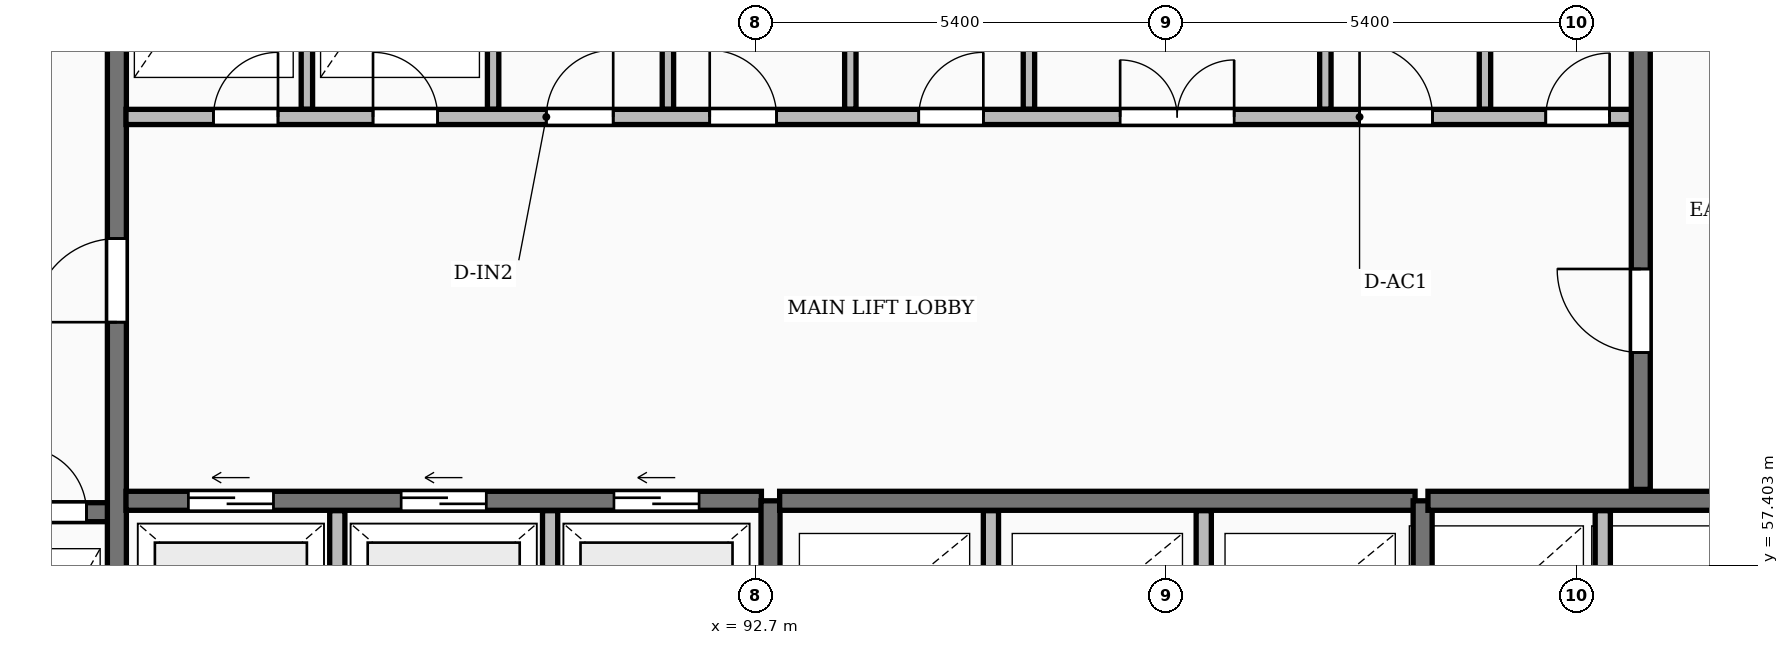
"""IFC4 building model, lengths in metres.
Left out: names, types, materials, properties, quantities, classifications, styles, units other than length and angle.
Written with IfcOpenShell. Run it as: python <this file> out.ifc"""

import sys

from ifc_helpers import new_model, si_unit, direction, frame, frame_2d, origin, place, context, subcontext, project, spatial, rectangle, extrude, element, fill, save


model = new_model("IFC4")
c1 = context("Model", 3, precision=1e-05, world=origin(), true_north=direction((0.0, 1.0)))
c2 = subcontext(c1, "Body", "Model", "MODEL_VIEW")
j1 = project(units=[si_unit("LENGTHUNIT", "METRE"), si_unit("PLANEANGLEUNIT", "RADIAN")], contexts=[c1])
p1 = place(None, origin())
s1 = spatial("IfcSite", under=j1, at=p1, CompositionType="ELEMENT")
p2 = place(p1, origin())
s2 = spatial("IfcBuilding", under=s1, at=p2, CompositionType="ELEMENT")
p3 = place(p2, frame((0.0, 0.0, 80.8)))
s3 = spatial("IfcBuildingStorey", under=s2, at=p3, CompositionType="ELEMENT", Elevation=80.8)
p4 = place(p3, frame((79.79, 58.1, 0.0), z_axis=(0.0, 0.0, 1.0), x_axis=(1.0, 0.0, 0.0)))
e1 = element("IfcWall", 1, at=p4, inside=s3, PredefinedType="SHEAR", context=c2, shape_type="SweptSolid", body=[
    extrude(rectangle(XDim=4.39, YDim=0.25, at=frame_2d((2.195, 0.0))), origin(), (0.0, 0.0, 1.0), 3.25),
])
p5 = place(p4, frame((1.05, 0.0, 0.0)))
e2 = element("IfcOpeningElement", 2, at=p5, cuts=e1, PredefinedType="OPENING", context=c2, shape_type="SweptSolid", body=[
    extrude(rectangle(XDim=1.12, YDim=2.12, at=frame_2d((0.56, 1.06))), frame((0.0, 0.135, 0.0), z_axis=(0.0, -1.0, 0.0), x_axis=(1.0, 0.0, 0.0)), (0.0, 0.0, 1.0), 0.27),
])
p6 = place(p4, frame((3.26, 0.0, 0.0)))
e3 = element("IfcOpeningElement", 3, at=p6, cuts=e1, PredefinedType="OPENING", context=c2, shape_type="SweptSolid", body=[
    extrude(rectangle(XDim=0.85, YDim=2.05, at=frame_2d((0.425, 1.025))), frame((0.0, 0.135, 0.0), z_axis=(0.0, -1.0, 0.0), x_axis=(1.0, 0.0, 0.0)), (0.0, 0.0, 1.0), 0.27),
])
p7 = place(p3, frame((84.3, 55.4, 0.0), z_axis=(0.0, 0.0, 1.0), x_axis=(0.0, 1.0, 0.0)))
e4 = element("IfcWall", 4, at=p7, inside=s3, PredefinedType="SHEAR", context=c2, shape_type="SweptSolid", body=[
    extrude(rectangle(XDim=11.6, YDim=0.25, at=frame_2d((5.8, 0.0))), origin(), (0.0, 0.0, 1.0), 3.25),
])
p8 = place(p7, frame((5.2, 0.0, 0.0)))
e5 = element("IfcOpeningElement", 5, at=p8, cuts=e4, PredefinedType="OPENING", context=c2, shape_type="SweptSolid", body=[
    extrude(rectangle(XDim=1.1, YDim=2.1, at=frame_2d((0.55, 1.05))), frame((0.0, 0.135, 0.0), z_axis=(0.0, -1.0, 0.0), x_axis=(1.0, 0.0, 0.0)), (0.0, 0.0, 1.0), 0.27),
])
for number, where, z_axis, x_axis in (
    (6, (87.2, 55.4, 0.0), (0.0, 0.0, 1.0), (0.0, 1.0, 0.0)),
    (7, (90.0, 55.4, 0.0), (0.0, 0.0, 1.0), (0.0, 1.0, 0.0)),
):
    element("IfcWall", number, at=place(p3, frame(where, z_axis=z_axis, x_axis=x_axis)), inside=s3, PredefinedType="PARTITIONING", context=c2, shape_type="SweptSolid", body=[
        extrude(rectangle(XDim=2.72, YDim=0.2, at=frame_2d((1.36, 0.0))), origin(), (0.0, 0.0, 1.0), 2.97),
    ])
p9 = place(p3, frame((84.42, 58.25, 0.0), z_axis=(0.0, 0.0, 1.0), x_axis=(1.0, 0.0, 0.0)))
e8 = element("IfcWall", 8, at=p9, inside=s3, PredefinedType="SHEAR", context=c2, shape_type="SweptSolid", body=[
    extrude(rectangle(XDim=8.36, YDim=0.25, at=frame_2d((4.18, 0.0))), origin(), (0.0, 0.0, 1.0), 3.25),
])
p10 = place(p9, frame((0.82, 0.0, 0.0)))
e9 = element("IfcOpeningElement", 9, at=p10, cuts=e8, PredefinedType="OPENING", context=c2, shape_type="SweptSolid", body=[
    extrude(rectangle(XDim=1.12, YDim=2.12, at=frame_2d((0.56, 1.06))), frame((0.0, 0.135, 0.0), z_axis=(0.0, -1.0, 0.0), x_axis=(1.0, 0.0, 0.0)), (0.0, 0.0, 1.0), 0.27),
])
p11 = place(p9, frame((3.62, 0.0, 0.0)))
e10 = element("IfcOpeningElement", 10, at=p11, cuts=e8, PredefinedType="OPENING", context=c2, shape_type="SweptSolid", body=[
    extrude(rectangle(XDim=1.12, YDim=2.12, at=frame_2d((0.56, 1.06))), frame((0.0, 0.135, 0.0), z_axis=(0.0, -1.0, 0.0), x_axis=(1.0, 0.0, 0.0)), (0.0, 0.0, 1.0), 0.27),
])
p12 = place(p9, frame((6.42, 0.0, 0.0)))
e11 = element("IfcOpeningElement", 11, at=p12, cuts=e8, PredefinedType="OPENING", context=c2, shape_type="SweptSolid", body=[
    extrude(rectangle(XDim=1.12, YDim=2.12, at=frame_2d((0.56, 1.06))), frame((0.0, 0.135, 0.0), z_axis=(0.0, -1.0, 0.0), x_axis=(1.0, 0.0, 0.0)), (0.0, 0.0, 1.0), 0.27),
])
p13 = place(p3, frame((92.9, 55.4, 0.0), z_axis=(0.0, 0.0, 1.0), x_axis=(0.0, 1.0, 0.0)))
e12 = element("IfcWall", 12, at=p13, inside=s3, PredefinedType="SHEAR", context=c2, shape_type="SweptSolid", body=[
    extrude(rectangle(XDim=2.85, YDim=0.25, at=frame_2d((1.425, 0.0))), origin(), (0.0, 0.0, 1.0), 3.25),
])
for number, where, z_axis, x_axis in (
    (13, (95.8, 55.4, 0.0), (0.0, 0.0, 1.0), (0.0, 1.0, 0.0)),
    (14, (98.6, 55.4, 0.0), (0.0, 0.0, 1.0), (0.0, 1.0, 0.0)),
):
    element("IfcWall", number, at=place(p3, frame(where, z_axis=z_axis, x_axis=x_axis)), inside=s3, PredefinedType="PARTITIONING", context=c2, shape_type="SweptSolid", body=[
        extrude(rectangle(XDim=2.72, YDim=0.2, at=frame_2d((1.36, 0.0))), origin(), (0.0, 0.0, 1.0), 2.97),
    ])
p14 = place(p3, frame((93.02, 58.25, 0.0), z_axis=(0.0, 0.0, 1.0), x_axis=(1.0, 0.0, 0.0)))
e15 = element("IfcWall", 15, at=p14, inside=s3, PredefinedType="SHEAR", context=c2, shape_type="SweptSolid", body=[
    extrude(rectangle(XDim=8.36, YDim=0.25, at=frame_2d((4.18, 0.0))), origin(), (0.0, 0.0, 1.0), 3.25),
])
p15 = place(p3, frame((101.48, 55.4, 0.0), z_axis=(0.0, 0.0, 1.0), x_axis=(0.0, 1.0, 0.0)))
e16 = element("IfcWall", 16, at=p15, inside=s3, PredefinedType="SHEAR", context=c2, shape_type="SweptSolid", body=[
    extrude(rectangle(XDim=2.85, YDim=0.25, at=frame_2d((1.425, 0.0))), origin(), (0.0, 0.0, 1.0), 3.25),
])
p16 = place(p3, frame((103.85, 55.4, 0.0), z_axis=(0.0, 0.0, 1.0), x_axis=(0.0, 1.0, 0.0)))
e17 = element("IfcWall", 17, at=p16, inside=s3, PredefinedType="PARTITIONING", context=c2, shape_type="SweptSolid", body=[
    extrude(rectangle(XDim=2.72, YDim=0.2, at=frame_2d((1.36, 0.0))), origin(), (0.0, 0.0, 1.0), 2.97),
])
p17 = place(p3, frame((101.55, 58.25, 0.0), z_axis=(0.0, 0.0, 1.0), x_axis=(1.0, 0.0, 0.0)))
e18 = element("IfcWall", 18, at=p17, inside=s3, PredefinedType="SHEAR", context=c2, shape_type="SweptSolid", body=[
    extrude(rectangle(XDim=4.6, YDim=0.25, at=frame_2d((2.3, 0.0))), origin(), (0.0, 0.0, 1.0), 3.25),
])
for number, where, z_axis, x_axis in (
    (19, (86.8, 63.4, 0.0), (0.0, 0.0, 1.0), (0.0, 1.0, 0.0)),
    (20, (89.25, 63.4, 0.0), (0.0, 0.0, 1.0), (0.0, 1.0, 0.0)),
    (21, (91.55, 63.4, 0.0), (0.0, 0.0, 1.0), (0.0, 1.0, 0.0)),
):
    element("IfcWall", number, at=place(p3, frame(where, z_axis=z_axis, x_axis=x_axis)), inside=s3, PredefinedType="PARTITIONING", context=c2, shape_type="SweptSolid", body=[
        extrude(rectangle(XDim=3.6, YDim=0.15, at=frame_2d((1.8, 0.0))), origin(), (0.0, 0.0, 1.0), 2.97),
    ])
p18 = place(p3, frame((93.95, 63.4, 0.0), z_axis=(0.0, 0.0, 1.0), x_axis=(0.0, 1.0, 0.0)))
e22 = element("IfcWall", 22, at=p18, inside=s3, PredefinedType="PARTITIONING", context=c2, shape_type="SweptSolid", body=[
    extrude(rectangle(XDim=3.6, YDim=0.15, at=frame_2d((1.8, 0.0))), origin(), (0.0, 0.0, 1.0), 2.277),
])
for number, where, z_axis, x_axis in (
    (23, (102.3, 63.4, 0.0), (0.0, 0.0, 1.0), (0.0, 1.0, 0.0)),
    (24, (96.3, 63.4, 0.0), (0.0, 0.0, 1.0), (0.0, 1.0, 0.0)),
    (25, (100.2, 63.4, 0.0), (0.0, 0.0, 1.0), (0.0, 1.0, 0.0)),
):
    element("IfcWall", number, at=place(p3, frame(where, z_axis=z_axis, x_axis=x_axis)), inside=s3, PredefinedType="PARTITIONING", context=c2, shape_type="SweptSolid", body=[
        extrude(rectangle(XDim=3.6, YDim=0.15, at=frame_2d((1.8, 0.0))), origin(), (0.0, 0.0, 1.0), 2.97),
    ])
p19 = place(p3, frame((84.42, 63.3, 0.0), z_axis=(0.0, 0.0, 1.0), x_axis=(1.0, 0.0, 0.0)))
e26 = element("IfcWall", 26, at=p19, inside=s3, PredefinedType="PARTITIONING", context=c2, shape_type="SweptSolid", body=[
    extrude(rectangle(XDim=19.83, YDim=0.2, at=frame_2d((9.915, 0.0))), origin(), (0.0, 0.0, 1.0), 2.97),
])
p20 = place(p19, frame((1.15, 0.0, 0.0)))
e27 = element("IfcOpeningElement", 27, at=p20, cuts=e26, PredefinedType="OPENING", context=c2, shape_type="SweptSolid", body=[
    extrude(rectangle(XDim=0.85, YDim=2.05, at=frame_2d((0.425, 1.025))), frame((0.0, 0.11, 0.0), z_axis=(0.0, -1.0, 0.0), x_axis=(1.0, 0.0, 0.0)), (0.0, 0.0, 1.0), 0.22),
])
p21 = place(p19, frame((3.25, 0.0, 0.0)))
e28 = element("IfcOpeningElement", 28, at=p21, cuts=e26, PredefinedType="OPENING", context=c2, shape_type="SweptSolid", body=[
    extrude(rectangle(XDim=0.85, YDim=2.05, at=frame_2d((0.425, 1.025))), frame((0.0, 0.11, 0.0), z_axis=(0.0, -1.0, 0.0), x_axis=(1.0, 0.0, 0.0)), (0.0, 0.0, 1.0), 0.22),
])
p22 = place(p19, frame((13.08, 0.0, 0.0)))
e29 = element("IfcOpeningElement", 29, at=p22, cuts=e26, PredefinedType="OPENING", context=c2, shape_type="SweptSolid", body=[
    extrude(rectangle(XDim=1.5, YDim=2.2, at=frame_2d((0.75, 1.1))), frame((0.0, 0.11, 0.0), z_axis=(0.0, -1.0, 0.0), x_axis=(1.0, 0.0, 0.0)), (0.0, 0.0, 1.0), 0.22),
])
p23 = place(p19, frame((5.53, 0.0, 0.0)))
e30 = element("IfcOpeningElement", 30, at=p23, cuts=e26, PredefinedType="OPENING", context=c2, shape_type="SweptSolid", body=[
    extrude(rectangle(XDim=0.88, YDim=2.06, at=frame_2d((0.44, 1.03))), frame((0.0, 0.11, 0.0), z_axis=(0.0, -1.0, 0.0), x_axis=(1.0, 0.0, 0.0)), (0.0, 0.0, 1.0), 0.22),
])
p24 = place(p19, frame((7.68, 0.0, 0.0)))
e31 = element("IfcOpeningElement", 31, at=p24, cuts=e26, PredefinedType="OPENING", context=c2, shape_type="SweptSolid", body=[
    extrude(rectangle(XDim=0.88, YDim=2.06, at=frame_2d((0.44, 1.03))), frame((0.0, 0.11, 0.0), z_axis=(0.0, -1.0, 0.0), x_axis=(1.0, 0.0, 0.0)), (0.0, 0.0, 1.0), 0.22),
])
p25 = place(p19, frame((10.43, 0.0, 0.0)))
e32 = element("IfcOpeningElement", 32, at=p25, cuts=e26, PredefinedType="OPENING", context=c2, shape_type="SweptSolid", body=[
    extrude(rectangle(XDim=0.85, YDim=2.05, at=frame_2d((0.425, 1.025))), frame((0.0, 0.11, 0.0), z_axis=(0.0, -1.0, 0.0), x_axis=(1.0, 0.0, 0.0)), (0.0, 0.0, 1.0), 0.22),
])
p26 = place(p19, frame((16.23, 0.0, 0.0)))
e33 = element("IfcOpeningElement", 33, at=p26, cuts=e26, PredefinedType="OPENING", context=c2, shape_type="SweptSolid", body=[
    extrude(rectangle(XDim=0.96, YDim=2.1, at=frame_2d((0.48, 1.05))), frame((0.0, 0.11, 0.0), z_axis=(0.0, -1.0, 0.0), x_axis=(1.0, 0.0, 0.0)), (0.0, 0.0, 1.0), 0.22),
])
p27 = place(p19, frame((18.68, 0.0, 0.0)))
e34 = element("IfcOpeningElement", 34, at=p27, cuts=e26, PredefinedType="OPENING", context=c2, shape_type="SweptSolid", body=[
    extrude(rectangle(XDim=0.84, YDim=2.04, at=frame_2d((0.42, 1.02))), frame((0.0, 0.11, 0.0), z_axis=(0.0, -1.0, 0.0), x_axis=(1.0, 0.0, 0.0)), (0.0, 0.0, 1.0), 0.22),
])
p28 = place(p3, frame((104.35, 58.4, 0.0), z_axis=(0.0, 0.0, 1.0), x_axis=(0.0, 1.0, 0.0)))
e35 = element("IfcWall", 35, at=p28, inside=s3, PredefinedType="SHEAR", context=c2, shape_type="SweptSolid", body=[
    extrude(rectangle(XDim=8.6, YDim=0.25, at=frame_2d((4.3, 0.0))), origin(), (0.0, 0.0, 1.0), 3.25),
])
p29 = place(p28, frame((1.8, 0.0, 0.0)))
e36 = element("IfcOpeningElement", 36, at=p29, cuts=e35, PredefinedType="OPENING", context=c2, shape_type="SweptSolid", body=[
    extrude(rectangle(XDim=1.1, YDim=2.1, at=frame_2d((0.55, 1.05))), frame((0.0, 0.135, 0.0), z_axis=(0.0, -1.0, 0.0), x_axis=(1.0, 0.0, 0.0)), (0.0, 0.0, 1.0), 0.27),
])
p30 = place(p6, origin())
e37 = element("IfcDoor", 37, at=p30, inside=s3, OperationType="SINGLE_SWING_LEFT", PredefinedType="DOOR", context=c2, shape_type="SweptSolid", body=[
    extrude(rectangle(XDim=0.85, YDim=2.05, at=frame_2d((0.425, 1.025))), frame((0.0, 0.025, 0.0), z_axis=(0.0, -1.0, 0.0), x_axis=(1.0, 0.0, 0.0)), (0.0, 0.0, 1.0), 0.05),
])
fill(e3, e37)
p31 = place(p8, origin())
e38 = element("IfcDoor", 38, at=p31, inside=s3, OperationType="SINGLE_SWING_LEFT", PredefinedType="DOOR", context=c2, shape_type="SweptSolid", body=[
    extrude(rectangle(XDim=1.1, YDim=2.1, at=frame_2d((0.55, 1.05))), frame((0.0, 0.025, 0.0), z_axis=(0.0, -1.0, 0.0), x_axis=(1.0, 0.0, 0.0)), (0.0, 0.0, 1.0), 0.05),
])
fill(e5, e38)
p32 = place(p10, origin())
e39 = element("IfcDoor", 39, at=p32, inside=s3, OperationType="SLIDING_TO_LEFT", PredefinedType="DOOR", context=c2, shape_type="SweptSolid", body=[
    extrude(rectangle(XDim=1.12, YDim=2.12, at=frame_2d((0.56, 1.06))), frame((0.0, 0.025, 0.0), z_axis=(0.0, -1.0, 0.0), x_axis=(1.0, 0.0, 0.0)), (0.0, 0.0, 1.0), 0.05),
])
fill(e9, e39)
p33 = place(p11, origin())
e40 = element("IfcDoor", 40, at=p33, inside=s3, OperationType="SLIDING_TO_LEFT", PredefinedType="DOOR", context=c2, shape_type="SweptSolid", body=[
    extrude(rectangle(XDim=1.12, YDim=2.12, at=frame_2d((0.56, 1.06))), frame((0.0, 0.025, 0.0), z_axis=(0.0, -1.0, 0.0), x_axis=(1.0, 0.0, 0.0)), (0.0, 0.0, 1.0), 0.05),
])
fill(e10, e40)
p34 = place(p12, origin())
e41 = element("IfcDoor", 41, at=p34, inside=s3, OperationType="SLIDING_TO_LEFT", PredefinedType="DOOR", context=c2, shape_type="SweptSolid", body=[
    extrude(rectangle(XDim=1.12, YDim=2.12, at=frame_2d((0.56, 1.06))), frame((0.0, 0.025, 0.0), z_axis=(0.0, -1.0, 0.0), x_axis=(1.0, 0.0, 0.0)), (0.0, 0.0, 1.0), 0.05),
])
fill(e11, e41)
p35 = place(p20, origin())
e42 = element("IfcDoor", 42, at=p35, inside=s3, OperationType="SINGLE_SWING_RIGHT", PredefinedType="DOOR", context=c2, shape_type="SweptSolid", body=[
    extrude(rectangle(XDim=0.85, YDim=2.05, at=frame_2d((0.425, 1.025))), frame((0.0, 0.025, 0.0), z_axis=(0.0, -1.0, 0.0), x_axis=(1.0, 0.0, 0.0)), (0.0, 0.0, 1.0), 0.05),
])
fill(e27, e42)
p36 = place(p21, origin())
e43 = element("IfcDoor", 43, at=p36, inside=s3, OperationType="SINGLE_SWING_LEFT", PredefinedType="DOOR", context=c2, shape_type="SweptSolid", body=[
    extrude(rectangle(XDim=0.85, YDim=2.05, at=frame_2d((0.425, 1.025))), frame((0.0, 0.025, 0.0), z_axis=(0.0, -1.0, 0.0), x_axis=(1.0, 0.0, 0.0)), (0.0, 0.0, 1.0), 0.05),
])
fill(e28, e43)
p37 = place(p22, origin())
e44 = element("IfcDoor", 44, at=p37, inside=s3, OperationType="DOUBLE_DOOR_SINGLE_SWING", PredefinedType="DOOR", context=c2, shape_type="SweptSolid", body=[
    extrude(rectangle(XDim=1.5, YDim=2.2, at=frame_2d((0.75, 1.1))), frame((0.0, 0.025, 0.0), z_axis=(0.0, -1.0, 0.0), x_axis=(1.0, 0.0, 0.0)), (0.0, 0.0, 1.0), 0.05),
])
fill(e29, e44)
p38 = place(p23, origin())
e45 = element("IfcDoor", 45, at=p38, inside=s3, OperationType="SINGLE_SWING_RIGHT", PredefinedType="DOOR", context=c2, shape_type="SweptSolid", body=[
    extrude(rectangle(XDim=0.88, YDim=2.06, at=frame_2d((0.44, 1.03))), frame((0.0, 0.025, 0.0), z_axis=(0.0, -1.0, 0.0), x_axis=(1.0, 0.0, 0.0)), (0.0, 0.0, 1.0), 0.05),
])
fill(e30, e45)
p39 = place(p24, origin())
e46 = element("IfcDoor", 46, at=p39, inside=s3, OperationType="SINGLE_SWING_LEFT", PredefinedType="DOOR", context=c2, shape_type="SweptSolid", body=[
    extrude(rectangle(XDim=0.88, YDim=2.06, at=frame_2d((0.44, 1.03))), frame((0.0, 0.025, 0.0), z_axis=(0.0, -1.0, 0.0), x_axis=(1.0, 0.0, 0.0)), (0.0, 0.0, 1.0), 0.05),
])
fill(e31, e46)
p40 = place(p25, origin())
e47 = element("IfcDoor", 47, at=p40, inside=s3, OperationType="SINGLE_SWING_RIGHT", PredefinedType="DOOR", context=c2, shape_type="SweptSolid", body=[
    extrude(rectangle(XDim=0.85, YDim=2.05, at=frame_2d((0.425, 1.025))), frame((0.0, 0.025, 0.0), z_axis=(0.0, -1.0, 0.0), x_axis=(1.0, 0.0, 0.0)), (0.0, 0.0, 1.0), 0.05),
])
fill(e32, e47)
p41 = place(p26, origin())
e48 = element("IfcDoor", 48, at=p41, inside=s3, OperationType="SINGLE_SWING_LEFT", PredefinedType="DOOR", context=c2, shape_type="SweptSolid", body=[
    extrude(rectangle(XDim=0.96, YDim=2.1, at=frame_2d((0.48, 1.05))), frame((0.0, 0.025, 0.0), z_axis=(0.0, -1.0, 0.0), x_axis=(1.0, 0.0, 0.0)), (0.0, 0.0, 1.0), 0.05),
])
fill(e33, e48)
p42 = place(p27, origin())
e49 = element("IfcDoor", 49, at=p42, inside=s3, OperationType="SINGLE_SWING_RIGHT", PredefinedType="DOOR", context=c2, shape_type="SweptSolid", body=[
    extrude(rectangle(XDim=0.84, YDim=2.04, at=frame_2d((0.42, 1.02))), frame((0.0, 0.025, 0.0), z_axis=(0.0, -1.0, 0.0), x_axis=(1.0, 0.0, 0.0)), (0.0, 0.0, 1.0), 0.05),
])
fill(e34, e49)
p43 = place(p29, origin())
e50 = element("IfcDoor", 50, at=p43, inside=s3, OperationType="SINGLE_SWING_RIGHT", PredefinedType="DOOR", context=c2, shape_type="SweptSolid", body=[
    extrude(rectangle(XDim=1.1, YDim=2.1, at=frame_2d((0.55, 1.05))), frame((0.0, 0.025, 0.0), z_axis=(0.0, -1.0, 0.0), x_axis=(1.0, 0.0, 0.0)), (0.0, 0.0, 1.0), 0.05),
])
fill(e36, e50)
save(model, sys.argv[1])
